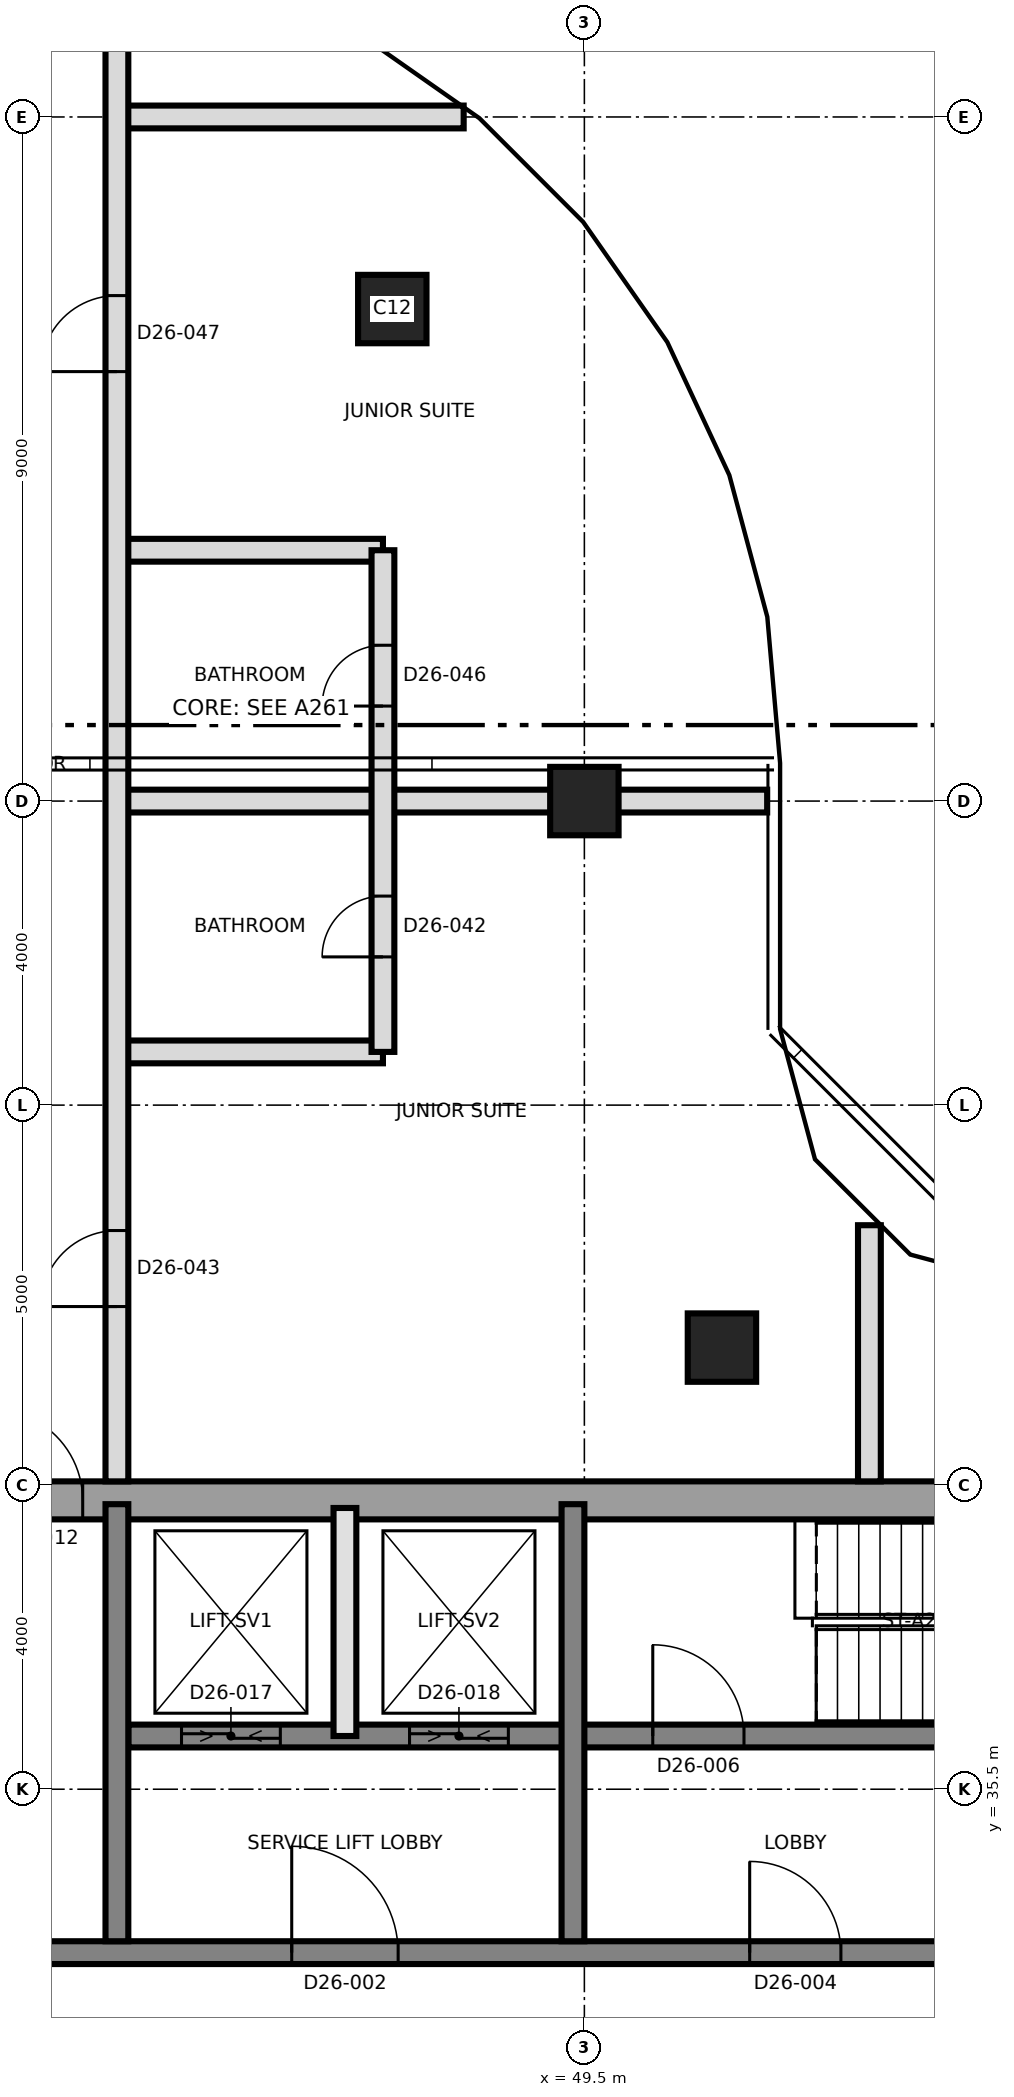
"""IFC4 building model, lengths in metres.
Left out: names, types, materials, properties, quantities, classifications, styles, units other than length and angle.
Written with IfcOpenShell. Run it as: python <this file> out.ifc"""

import sys

from ifc_helpers import new_model, si_unit, direction, frame, frame_2d, origin, origin_2d, place, context, subcontext, project, spatial, rectangle, extrude, element, fill, save


model = new_model("IFC4")
c1 = context("Model", 3, precision=1e-05, world=origin(), true_north=direction((0.0, 1.0)))
c2 = subcontext(c1, "Body", "Model", "MODEL_VIEW")
j1 = project(units=[si_unit("LENGTHUNIT", "METRE"), si_unit("PLANEANGLEUNIT", "RADIAN")], contexts=[c1])
p1 = place(None, origin())
s1 = spatial("IfcSite", under=j1, at=p1, CompositionType="ELEMENT")
p2 = place(p1, origin())
s2 = spatial("IfcBuilding", under=s1, at=p2, CompositionType="ELEMENT")
p3 = place(p2, frame((0.0, 0.0, 232.8)))
s3 = spatial("IfcBuildingStorey", under=s2, at=p3, CompositionType="ELEMENT", Elevation=232.8)
p4 = place(p3, frame((31.25, 39.3, 0.0), z_axis=(0.0, 0.0, 1.0), x_axis=(1.0, 0.0, 0.0)))
e1 = element("IfcWall", 1, at=p4, inside=s3, PredefinedType="SHEAR", context=c2, shape_type="SweptSolid", body=[
    extrude(rectangle(XDim=27.0, YDim=0.5, at=frame_2d((13.5, 0.0))), origin(), (0.0, 0.0, 1.0), 3.7),
])
p5 = place(p4, frame((10.45, 0.0, 0.0)))
e2 = element("IfcOpeningElement", 2, at=p5, cuts=e1, PredefinedType="OPENING", context=c2, shape_type="SweptSolid", body=[
    extrude(rectangle(XDim=1.2, YDim=2.1, at=frame_2d((0.6, 1.05))), frame((0.0, 0.26, 0.0), z_axis=(0.0, -1.0, 0.0), x_axis=(1.0, 0.0, 0.0)), (0.0, 0.0, 1.0), 0.52),
])
p6 = place(p3, frame((31.75, 33.35, 0.0), z_axis=(0.0, 0.0, 1.0), x_axis=(1.0, 0.0, 0.0)))
e3 = element("IfcWall", 3, at=p6, inside=s3, PredefinedType="SHEAR", context=c2, shape_type="SweptSolid", body=[
    extrude(rectangle(XDim=26.5, YDim=0.3, at=frame_2d((13.25, 0.0))), origin(), (0.0, 0.0, 1.0), 3.7),
])
p7 = place(p6, frame((13.9, 0.0, 0.0)))
e4 = element("IfcOpeningElement", 4, at=p7, cuts=e3, PredefinedType="OPENING", context=c2, shape_type="SweptSolid", body=[
    extrude(rectangle(XDim=1.4, YDim=2.1, at=frame_2d((0.7, 1.05))), frame((0.0, 0.16, 0.0), z_axis=(0.0, -1.0, 0.0), x_axis=(1.0, 0.0, 0.0)), (0.0, 0.0, 1.0), 0.32),
])
p8 = place(p6, frame((5.375, 0.0, 0.0)))
e5 = element("IfcOpeningElement", 5, at=p8, cuts=e3, PredefinedType="OPENING", context=c2, shape_type="SweptSolid", body=[
    extrude(rectangle(XDim=1.2, YDim=2.1, at=frame_2d((0.6, 1.05))), frame((0.0, 0.16, 0.0), z_axis=(0.0, -1.0, 0.0), x_axis=(1.0, 0.0, 0.0)), (0.0, 0.0, 1.0), 0.32),
])
p9 = place(p6, frame((19.925, 0.0, 0.0)))
e6 = element("IfcOpeningElement", 6, at=p9, cuts=e3, PredefinedType="OPENING", context=c2, shape_type="SweptSolid", body=[
    extrude(rectangle(XDim=1.2, YDim=2.1, at=frame_2d((0.6, 1.05))), frame((0.0, 0.16, 0.0), z_axis=(0.0, -1.0, 0.0), x_axis=(1.0, 0.0, 0.0)), (0.0, 0.0, 1.0), 0.32),
])
p10 = place(p3, frame((43.5, 36.2, 0.0), z_axis=(0.0, 0.0, 1.0), x_axis=(1.0, 0.0, 0.0)))
e7 = element("IfcWall", 7, at=p10, inside=s3, PredefinedType="SHEAR", context=c2, shape_type="SweptSolid", body=[
    extrude(rectangle(XDim=14.75, YDim=0.3, at=frame_2d((7.375, 0.0))), origin(), (0.0, 0.0, 1.0), 3.7),
])
p11 = place(p10, frame((6.9, 0.0, 0.0)))
e8 = element("IfcOpeningElement", 8, at=p11, cuts=e7, PredefinedType="OPENING", context=c2, shape_type="SweptSolid", body=[
    extrude(rectangle(XDim=1.2, YDim=2.1, at=frame_2d((0.6, 1.05))), frame((0.0, 0.16, 0.0), z_axis=(0.0, -1.0, 0.0), x_axis=(1.0, 0.0, 0.0)), (0.0, 0.0, 1.0), 0.32),
])
p12 = place(p10, frame((0.7, 0.0, 0.0)))
e9 = element("IfcOpeningElement", 9, at=p12, cuts=e7, PredefinedType="OPENING", context=c2, shape_type="SweptSolid", body=[
    extrude(rectangle(XDim=1.3, YDim=2.4, at=frame_2d((0.65, 1.2))), frame((0.0, 0.16, 0.0), z_axis=(0.0, -1.0, 0.0), x_axis=(1.0, 0.0, 0.0)), (0.0, 0.0, 1.0), 0.32),
])
p13 = place(p10, frame((3.7, 0.0, 0.0)))
e10 = element("IfcOpeningElement", 10, at=p13, cuts=e7, PredefinedType="OPENING", context=c2, shape_type="SweptSolid", body=[
    extrude(rectangle(XDim=1.3, YDim=2.4, at=frame_2d((0.65, 1.2))), frame((0.0, 0.16, 0.0), z_axis=(0.0, -1.0, 0.0), x_axis=(1.0, 0.0, 0.0)), (0.0, 0.0, 1.0), 0.32),
])
for number, where, z_axis, x_axis in (
    (11, (43.35, 33.5, 0.0), (0.0, 0.0, 1.0), (0.0, 1.0, 0.0)),
    (12, (49.35, 33.5, 0.0), (0.0, 0.0, 1.0), (0.0, 1.0, 0.0)),
):
    element("IfcWall", number, at=place(p3, frame(where, z_axis=z_axis, x_axis=x_axis)), inside=s3, PredefinedType="SHEAR", context=c2, shape_type="SweptSolid", body=[
        extrude(rectangle(XDim=5.75, YDim=0.3, at=frame_2d((2.875, 0.0))), origin(), (0.0, 0.0, 1.0), 3.7),
    ])
for number, where, z_axis, x_axis in (
    (13, (51.31, 41.31, 0.0), (0.0, 0.0, 1.0), (1.0, 0.0, 0.0)),
    (14, (49.5, 48.5, 0.0), (0.0, 0.0, 1.0), (1.0, 0.0, 0.0)),
    (15, (46.973, 54.973, 0.0), (0.0, 0.0, 1.0), (1.0, 0.0, 0.0)),
):
    element("IfcColumn", number, at=place(p3, frame(where, z_axis=z_axis, x_axis=x_axis)), inside=s3, PredefinedType="COLUMN", context=c2, shape_type="SweptSolid", body=[
        extrude(rectangle(XDim=0.9, YDim=0.9, at=origin_2d()), origin(), (0.0, 0.0, 1.0), 3.7),
    ])
p14 = place(p3, frame((46.35, 36.2, 0.0), z_axis=(0.0, 0.0, 1.0), x_axis=(0.0, 1.0, 0.0)))
e16 = element("IfcWall", 16, at=p14, inside=s3, PredefinedType="SOLIDWALL", context=c2, shape_type="SweptSolid", body=[
    extrude(rectangle(XDim=3.0, YDim=0.3, at=frame_2d((1.5, 0.0))), origin(), (0.0, 0.0, 1.0), 3.4),
])
p15 = place(p3, frame((43.35, 45.2, 0.0), z_axis=(0.0, 0.0, 1.0), x_axis=(1.0, 0.0, 0.0)))
e17 = element("IfcWall", 17, at=p15, inside=s3, PredefinedType="PARTITIONING", context=c2, shape_type="SweptSolid", body=[
    extrude(rectangle(XDim=3.5, YDim=0.3, at=frame_2d((1.75, 0.0))), origin(), (0.0, 0.0, 1.0), 3.4),
])
p16 = place(p3, frame((43.35, 48.5, 0.0), z_axis=(0.0, 0.0, 1.0), x_axis=(1.0, 0.0, 0.0)))
e18 = element("IfcWall", 18, at=p16, inside=s3, PredefinedType="PARTITIONING", context=c2, shape_type="SweptSolid", body=[
    extrude(rectangle(XDim=8.555, YDim=0.3, at=frame_2d((4.277, 0.0))), origin(), (0.0, 0.0, 1.0), 3.4),
])
p17 = place(p3, frame((43.35, 51.8, 0.0), z_axis=(0.0, 0.0, 1.0), x_axis=(1.0, 0.0, 0.0)))
e19 = element("IfcWall", 19, at=p17, inside=s3, PredefinedType="PARTITIONING", context=c2, shape_type="SweptSolid", body=[
    extrude(rectangle(XDim=3.5, YDim=0.3, at=frame_2d((1.75, 0.0))), origin(), (0.0, 0.0, 1.0), 3.4),
])
p18 = place(p3, frame((43.35, 57.5, 0.0), z_axis=(0.0, 0.0, 1.0), x_axis=(1.0, 0.0, 0.0)))
e20 = element("IfcWall", 20, at=p18, inside=s3, PredefinedType="PARTITIONING", context=c2, shape_type="SweptSolid", body=[
    extrude(rectangle(XDim=4.562, YDim=0.3, at=frame_2d((2.281, 0.0))), origin(), (0.0, 0.0, 1.0), 3.4),
])
p19 = place(p3, frame((43.35, 39.55, 0.0), z_axis=(0.0, 0.0, 1.0), x_axis=(0.0, 1.0, 0.0)))
e21 = element("IfcWall", 21, at=p19, inside=s3, PredefinedType="PARTITIONING", context=c2, shape_type="SweptSolid", body=[
    extrude(rectangle(XDim=19.0, YDim=0.3, at=frame_2d((9.5, 0.0))), origin(), (0.0, 0.0, 1.0), 3.4),
])
p20 = place(p19, frame((2.3, 0.0, 0.0)))
e22 = element("IfcOpeningElement", 22, at=p20, cuts=e21, PredefinedType="OPENING", context=c2, shape_type="SweptSolid", body=[
    extrude(rectangle(XDim=1.0, YDim=2.4, at=frame_2d((0.5, 1.2))), frame((0.0, 0.16, 0.0), z_axis=(0.0, -1.0, 0.0), x_axis=(1.0, 0.0, 0.0)), (0.0, 0.0, 1.0), 0.32),
])
p21 = place(p19, frame((14.6, 0.0, 0.0)))
e23 = element("IfcOpeningElement", 23, at=p21, cuts=e21, PredefinedType="OPENING", context=c2, shape_type="SweptSolid", body=[
    extrude(rectangle(XDim=1.0, YDim=2.4, at=frame_2d((0.5, 1.2))), frame((0.0, 0.16, 0.0), z_axis=(0.0, -1.0, 0.0), x_axis=(1.0, 0.0, 0.0)), (0.0, 0.0, 1.0), 0.32),
])
p22 = place(p3, frame((46.85, 45.2, 0.0), z_axis=(0.0, 0.0, 1.0), x_axis=(0.0, 1.0, 0.0)))
e24 = element("IfcWall", 24, at=p22, inside=s3, PredefinedType="PARTITIONING", context=c2, shape_type="SweptSolid", body=[
    extrude(rectangle(XDim=6.6, YDim=0.3, at=frame_2d((3.3, 0.0))), origin(), (0.0, 0.0, 1.0), 3.4),
])
p23 = place(p22, frame((1.25, 0.0, 0.0)))
e25 = element("IfcOpeningElement", 25, at=p23, cuts=e24, PredefinedType="OPENING", context=c2, shape_type="SweptSolid", body=[
    extrude(rectangle(XDim=0.8, YDim=2.1, at=frame_2d((0.4, 1.05))), frame((0.0, 0.16, 0.0), z_axis=(0.0, -1.0, 0.0), x_axis=(1.0, 0.0, 0.0)), (0.0, 0.0, 1.0), 0.32),
])
p24 = place(p22, frame((4.55, 0.0, 0.0)))
e26 = element("IfcOpeningElement", 26, at=p24, cuts=e24, PredefinedType="OPENING", context=c2, shape_type="SweptSolid", body=[
    extrude(rectangle(XDim=0.8, YDim=2.1, at=frame_2d((0.4, 1.05))), frame((0.0, 0.16, 0.0), z_axis=(0.0, -1.0, 0.0), x_axis=(1.0, 0.0, 0.0)), (0.0, 0.0, 1.0), 0.32),
])
p25 = place(p3, frame((53.25, 39.55, 0.0), z_axis=(0.0, 0.0, 1.0), x_axis=(0.0, 1.0, 0.0)))
e27 = element("IfcWall", 27, at=p25, inside=s3, PredefinedType="PARTITIONING", context=c2, shape_type="SweptSolid", body=[
    extrude(rectangle(XDim=3.37, YDim=0.3, at=frame_2d((1.685, 0.0))), origin(), (0.0, 0.0, 1.0), 3.4),
])
p26 = place(p7, origin())
e28 = element("IfcDoor", 28, at=p26, inside=s3, OperationType="SINGLE_SWING_RIGHT", PredefinedType="DOOR", context=c2, shape_type="SweptSolid", body=[
    extrude(rectangle(XDim=1.4, YDim=2.1, at=frame_2d((0.7, 1.05))), frame((0.0, 0.025, 0.0), z_axis=(0.0, -1.0, 0.0), x_axis=(1.0, 0.0, 0.0)), (0.0, 0.0, 1.0), 0.05),
])
fill(e4, e28)
p27 = place(p9, origin())
e29 = element("IfcDoor", 29, at=p27, inside=s3, OperationType="SINGLE_SWING_RIGHT", PredefinedType="DOOR", context=c2, shape_type="SweptSolid", body=[
    extrude(rectangle(XDim=1.2, YDim=2.1, at=frame_2d((0.6, 1.05))), frame((0.0, 0.025, 0.0), z_axis=(0.0, -1.0, 0.0), x_axis=(1.0, 0.0, 0.0)), (0.0, 0.0, 1.0), 0.05),
])
fill(e6, e29)
p28 = place(p11, origin())
e30 = element("IfcDoor", 30, at=p28, inside=s3, OperationType="SINGLE_SWING_LEFT", PredefinedType="DOOR", context=c2, shape_type="SweptSolid", body=[
    extrude(rectangle(XDim=1.2, YDim=2.1, at=frame_2d((0.6, 1.05))), frame((0.0, 0.025, 0.0), z_axis=(0.0, -1.0, 0.0), x_axis=(1.0, 0.0, 0.0)), (0.0, 0.0, 1.0), 0.05),
])
fill(e8, e30)
p29 = place(p5, origin())
e31 = element("IfcDoor", 31, at=p29, inside=s3, OperationType="SINGLE_SWING_RIGHT", PredefinedType="DOOR", context=c2, shape_type="SweptSolid", body=[
    extrude(rectangle(XDim=1.2, YDim=2.1, at=frame_2d((0.6, 1.05))), frame((0.0, 0.025, 0.0), z_axis=(0.0, -1.0, 0.0), x_axis=(1.0, 0.0, 0.0)), (0.0, 0.0, 1.0), 0.05),
])
fill(e2, e31)
p30 = place(p12, origin())
e32 = element("IfcDoor", 32, at=p30, inside=s3, OperationType="SLIDING_TO_LEFT", PredefinedType="DOOR", context=c2, shape_type="SweptSolid", body=[
    extrude(rectangle(XDim=1.3, YDim=2.4, at=frame_2d((0.65, 1.2))), frame((0.0, 0.025, 0.0), z_axis=(0.0, -1.0, 0.0), x_axis=(1.0, 0.0, 0.0)), (0.0, 0.0, 1.0), 0.05),
])
fill(e9, e32)
p31 = place(p13, origin())
e33 = element("IfcDoor", 33, at=p31, inside=s3, OperationType="SLIDING_TO_LEFT", PredefinedType="DOOR", context=c2, shape_type="SweptSolid", body=[
    extrude(rectangle(XDim=1.3, YDim=2.4, at=frame_2d((0.65, 1.2))), frame((0.0, 0.025, 0.0), z_axis=(0.0, -1.0, 0.0), x_axis=(1.0, 0.0, 0.0)), (0.0, 0.0, 1.0), 0.05),
])
fill(e10, e33)
p32 = place(p23, origin())
e34 = element("IfcDoor", 34, at=p32, inside=s3, OperationType="SINGLE_SWING_RIGHT", PredefinedType="DOOR", context=c2, shape_type="SweptSolid", body=[
    extrude(rectangle(XDim=0.8, YDim=2.1, at=frame_2d((0.4, 1.05))), frame((0.0, 0.025, 0.0), z_axis=(0.0, -1.0, 0.0), x_axis=(1.0, 0.0, 0.0)), (0.0, 0.0, 1.0), 0.05),
])
fill(e25, e34)
p33 = place(p20, origin())
e35 = element("IfcDoor", 35, at=p33, inside=s3, OperationType="SINGLE_SWING_LEFT", PredefinedType="DOOR", context=c2, shape_type="SweptSolid", body=[
    extrude(rectangle(XDim=1.0, YDim=2.4, at=frame_2d((0.5, 1.2))), frame((0.0, 0.025, 0.0), z_axis=(0.0, -1.0, 0.0), x_axis=(1.0, 0.0, 0.0)), (0.0, 0.0, 1.0), 0.05),
])
fill(e22, e35)
p34 = place(p24, origin())
e36 = element("IfcDoor", 36, at=p34, inside=s3, OperationType="SINGLE_SWING_LEFT", PredefinedType="DOOR", context=c2, shape_type="SweptSolid", body=[
    extrude(rectangle(XDim=0.8, YDim=2.1, at=frame_2d((0.4, 1.05))), frame((0.0, 0.025, 0.0), z_axis=(0.0, -1.0, 0.0), x_axis=(1.0, 0.0, 0.0)), (0.0, 0.0, 1.0), 0.05),
])
fill(e26, e36)
p35 = place(p21, origin())
e37 = element("IfcDoor", 37, at=p35, inside=s3, OperationType="SINGLE_SWING_RIGHT", PredefinedType="DOOR", context=c2, shape_type="SweptSolid", body=[
    extrude(rectangle(XDim=1.0, YDim=2.4, at=frame_2d((0.5, 1.2))), frame((0.0, 0.025, 0.0), z_axis=(0.0, -1.0, 0.0), x_axis=(1.0, 0.0, 0.0)), (0.0, 0.0, 1.0), 0.05),
])
fill(e23, e37)
save(model, sys.argv[1])
